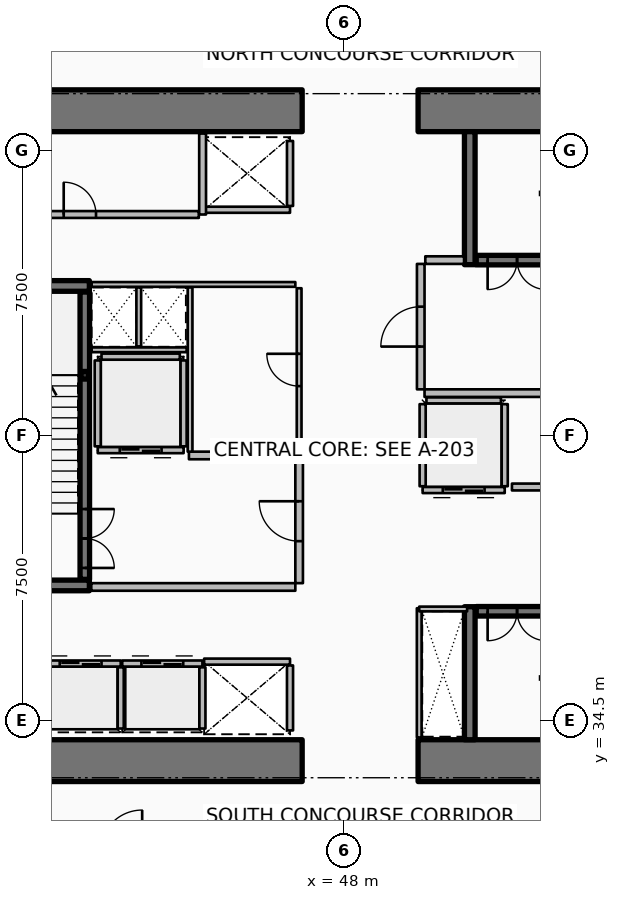
"""IFC4 building model, lengths in metres.
Left out: names, types, materials, properties, quantities, classifications, styles, units other than length and angle.
Written with IfcOpenShell. Run it as: python <this file> out.ifc"""

import sys

from ifc_helpers import new_model, si_unit, direction, frame, frame_2d, origin, origin_2d, place, context, subcontext, project, spatial, rectangle, hollow_rectangle, extrude, element, fill, save


model = new_model("IFC4")
c1 = context("Model", 3, precision=1e-05, world=origin(), true_north=direction((0.0, 1.0)))
c2 = subcontext(c1, "Body", "Model", "MODEL_VIEW")
j1 = project(units=[si_unit("LENGTHUNIT", "METRE"), si_unit("PLANEANGLEUNIT", "RADIAN")], contexts=[c1])
p1 = place(None, origin())
s1 = spatial("IfcSite", under=j1, at=p1, CompositionType="ELEMENT")
p2 = place(p1, origin())
s2 = spatial("IfcBuilding", under=s1, at=p2, CompositionType="ELEMENT")
p3 = place(p2, frame((0.0, 0.0, 7.2)))
s3 = spatial("IfcBuildingStorey", under=s2, at=p3, CompositionType="ELEMENT", Elevation=7.2)
for number, where, z_axis, x_axis in (
    (1, (36.7, 33.45, 0.0), (0.0, 0.0, 1.0), (1.0, 0.0, 0.0)),
    (2, (49.95, 33.45, 0.0), (0.0, 0.0, 1.0), (1.0, 0.0, 0.0)),
    (3, (36.7, 50.55, 0.0), (0.0, 0.0, 1.0), (1.0, 0.0, 0.0)),
    (4, (49.95, 50.55, 0.0), (0.0, 0.0, 1.0), (1.0, 0.0, 0.0)),
):
    element("IfcWall", number, at=place(p3, frame(where, z_axis=z_axis, x_axis=x_axis)), inside=s3, PredefinedType="SHEAR", context=c2, shape_type="SweptSolid", body=[
        extrude(rectangle(XDim=10.2, YDim=1.1, at=frame_2d((5.1, 0.0))), origin(), (0.0, 0.0, 1.0), 4.8),
    ])
for number, where, z_axis, x_axis in (
    (5, (37.8, 38.06, 0.0), (0.0, 0.0, 1.0), (1.0, 0.0, 0.0)),
    (6, (37.8, 45.94, 0.0), (0.0, 0.0, 1.0), (1.0, 0.0, 0.0)),
    (7, (51.31, 46.5, 0.0), (0.0, 0.0, 1.0), (0.0, 1.0, 0.0)),
    (8, (51.31, 34.0, 0.0), (0.0, 0.0, 1.0), (0.0, 1.0, 0.0)),
):
    element("IfcWall", number, at=place(p3, frame(where, z_axis=z_axis, x_axis=x_axis)), inside=s3, PredefinedType="SHEAR", context=c2, shape_type="SweptSolid", body=[
        extrude(rectangle(XDim=3.5, YDim=0.28, at=frame_2d((1.75, 0.0))), origin(), (0.0, 0.0, 1.0), 4.8),
    ])
p4 = place(p3, frame((41.18, 43.59, 0.0), z_axis=(0.0, 0.0, 1.0), x_axis=(1.0, 0.0, 0.0)))
e9 = element("IfcColumn", 9, at=p4, inside=s3, PredefinedType="COLUMN", context=c2, shape_type="SweptSolid", body=[
    extrude(hollow_rectangle(XDim=0.2, YDim=0.2, WallThickness=0.01, InnerFilletRadius=0.01, OuterFilletRadius=0.02, at=origin_2d()), origin(), (0.0, 0.0, 1.0), 2.195),
])
p5 = place(p3, frame((41.18, 38.22, 0.0), z_axis=(0.0, 0.0, 1.0), x_axis=(0.0, 1.0, 0.0)))
e10 = element("IfcWall", 10, at=p5, inside=s3, PredefinedType="SOLIDWALL", context=c2, shape_type="SweptSolid", body=[
    extrude(rectangle(XDim=7.56, YDim=0.25, at=frame_2d((3.78, 0.0))), origin(), (0.0, 0.0, 1.0), 4.48),
])
p6 = place(p5, frame((0.3, 0.0, 0.0)))
e11 = element("IfcOpeningElement", 11, at=p6, cuts=e10, PredefinedType="OPENING", context=c2, shape_type="SweptSolid", body=[
    extrude(rectangle(XDim=1.55, YDim=2.15, at=frame_2d((0.775, 1.075))), frame((0.0, 0.135, 0.0), z_axis=(0.0, -1.0, 0.0), x_axis=(1.0, 0.0, 0.0)), (0.0, 0.0, 1.0), 0.27),
])
p7 = place(p3, frame((51.48, 46.62, 0.0), z_axis=(0.0, 0.0, 1.0), x_axis=(1.0, 0.0, 0.0)))
e12 = element("IfcWall", 12, at=p7, inside=s3, PredefinedType="SOLIDWALL", context=c2, shape_type="SweptSolid", body=[
    extrude(rectangle(XDim=7.54, YDim=0.25, at=frame_2d((3.77, 0.0))), origin(), (0.0, 0.0, 1.0), 4.48),
])
p8 = place(p7, frame((0.3, 0.0, 0.0)))
e13 = element("IfcOpeningElement", 13, at=p8, cuts=e12, PredefinedType="OPENING", context=c2, shape_type="SweptSolid", body=[
    extrude(rectangle(XDim=1.55, YDim=2.15, at=frame_2d((0.775, 1.075))), frame((0.0, 0.135, 0.0), z_axis=(0.0, -1.0, 0.0), x_axis=(1.0, 0.0, 0.0)), (0.0, 0.0, 1.0), 0.27),
])
p9 = place(p3, frame((51.48, 37.38, 0.0), z_axis=(0.0, 0.0, 1.0), x_axis=(1.0, 0.0, 0.0)))
e14 = element("IfcWall", 14, at=p9, inside=s3, PredefinedType="SOLIDWALL", context=c2, shape_type="SweptSolid", body=[
    extrude(rectangle(XDim=7.54, YDim=0.25, at=frame_2d((3.77, 0.0))), origin(), (0.0, 0.0, 1.0), 4.48),
])
p10 = place(p9, frame((0.3, 0.0, 0.0)))
e15 = element("IfcOpeningElement", 15, at=p10, cuts=e14, PredefinedType="OPENING", context=c2, shape_type="SweptSolid", body=[
    extrude(rectangle(XDim=1.55, YDim=2.15, at=frame_2d((0.775, 1.075))), frame((0.0, 0.135, 0.0), z_axis=(0.0, -1.0, 0.0), x_axis=(1.0, 0.0, 0.0)), (0.0, 0.0, 1.0), 0.27),
])
p11 = place(p3, frame((40.015, 36.005, 0.0), z_axis=(0.0, 0.0, 1.0), x_axis=(1.0, 0.0, 0.0)))
e16 = element("IfcWall", 16, at=p11, inside=s3, PredefinedType="PARTITIONING", context=c2, shape_type="SweptSolid", body=[
    extrude(rectangle(XDim=2.11, YDim=0.16, at=frame_2d((1.055, 0.0))), origin(), (0.0, 0.0, 1.0), 4.48),
])
p12 = place(p11, frame((0.505, 0.0, 0.0)))
e17 = element("IfcOpeningElement", 17, at=p12, cuts=e16, PredefinedType="OPENING", context=c2, shape_type="SweptSolid", body=[
    extrude(rectangle(XDim=1.1, YDim=2.1, at=frame_2d((0.55, 1.05))), frame((0.0, 0.09, 0.0), z_axis=(0.0, -1.0, 0.0), x_axis=(1.0, 0.0, 0.0)), (0.0, 0.0, 1.0), 0.18),
])
p13 = place(p3, frame((42.125, 34.295, 0.0), z_axis=(0.0, 0.0, 1.0), x_axis=(0.0, 1.0, 0.0)))
e18 = element("IfcWall", 18, at=p13, inside=s3, PredefinedType="PARTITIONING", context=c2, shape_type="SweptSolid", body=[
    extrude(rectangle(XDim=1.61, YDim=0.16, at=frame_2d((0.805, 0.0))), origin(), (0.0, 0.0, 1.0), 4.48),
])
p14 = place(p3, frame((42.165, 36.005, 0.0), z_axis=(0.0, 0.0, 1.0), x_axis=(1.0, 0.0, 0.0)))
e19 = element("IfcWall", 19, at=p14, inside=s3, PredefinedType="PARTITIONING", context=c2, shape_type="SweptSolid", body=[
    extrude(rectangle(XDim=2.11, YDim=0.16, at=frame_2d((1.055, 0.0))), origin(), (0.0, 0.0, 1.0), 4.48),
])
p15 = place(p14, frame((0.505, 0.0, 0.0)))
e20 = element("IfcOpeningElement", 20, at=p15, cuts=e19, PredefinedType="OPENING", context=c2, shape_type="SweptSolid", body=[
    extrude(rectangle(XDim=1.1, YDim=2.1, at=frame_2d((0.55, 1.05))), frame((0.0, 0.09, 0.0), z_axis=(0.0, -1.0, 0.0), x_axis=(1.0, 0.0, 0.0)), (0.0, 0.0, 1.0), 0.18),
])
p16 = place(p3, frame((44.275, 34.295, 0.0), z_axis=(0.0, 0.0, 1.0), x_axis=(0.0, 1.0, 0.0)))
e21 = element("IfcWall", 21, at=p16, inside=s3, PredefinedType="PARTITIONING", context=c2, shape_type="SweptSolid", body=[
    extrude(rectangle(XDim=1.61, YDim=0.16, at=frame_2d((0.805, 0.0))), origin(), (0.0, 0.0, 1.0), 4.48),
])
p17 = place(p3, frame((46.58, 47.945, 0.0), z_axis=(0.0, 0.0, 1.0), x_axis=(-1.0, 0.0, 0.0)))
e22 = element("IfcWall", 22, at=p17, inside=s3, PredefinedType="PARTITIONING", context=c2, shape_type="SweptSolid", body=[
    extrude(rectangle(XDim=2.26, YDim=0.16, at=frame_2d((1.13, 0.0))), origin(), (0.0, 0.0, 1.0), 4.48),
])
p18 = place(p3, frame((46.58, 48.045, 0.0), z_axis=(0.0, 0.0, 1.0), x_axis=(0.0, 1.0, 0.0)))
e23 = element("IfcWall", 23, at=p18, inside=s3, PredefinedType="PARTITIONING", context=c2, shape_type="SweptSolid", body=[
    extrude(rectangle(XDim=1.71, YDim=0.16, at=frame_2d((0.855, 0.0))), origin(), (0.0, 0.0, 1.0), 4.48),
])
p19 = place(p3, frame((44.32, 36.055, 0.0), z_axis=(0.0, 0.0, 1.0), x_axis=(1.0, 0.0, 0.0)))
e24 = element("IfcWall", 24, at=p19, inside=s3, PredefinedType="PARTITIONING", context=c2, shape_type="SweptSolid", body=[
    extrude(rectangle(XDim=2.26, YDim=0.16, at=frame_2d((1.13, 0.0))), origin(), (0.0, 0.0, 1.0), 4.48),
])
p20 = place(p3, frame((46.58, 34.245, 0.0), z_axis=(0.0, 0.0, 1.0), x_axis=(0.0, 1.0, 0.0)))
e25 = element("IfcWall", 25, at=p20, inside=s3, PredefinedType="PARTITIONING", context=c2, shape_type="SweptSolid", body=[
    extrude(rectangle(XDim=1.71, YDim=0.16, at=frame_2d((0.855, 0.0))), origin(), (0.0, 0.0, 1.0), 4.48),
])
p21 = place(p3, frame((43.78, 41.62, 0.0), z_axis=(0.0, 0.0, 1.0), x_axis=(-1.0, 0.0, 0.0)))
e26 = element("IfcWall", 26, at=p21, inside=s3, PredefinedType="PARTITIONING", context=c2, shape_type="SweptSolid", body=[
    extrude(rectangle(XDim=2.26, YDim=0.16, at=frame_2d((1.13, 0.0))), origin(), (0.0, 0.0, 1.0), 4.48),
])
p22 = place(p21, frame((0.58, 0.0, 0.0)))
e27 = element("IfcOpeningElement", 27, at=p22, cuts=e26, PredefinedType="OPENING", context=c2, shape_type="SweptSolid", body=[
    extrude(rectangle(XDim=1.1, YDim=2.1, at=frame_2d((0.55, 1.05))), frame((0.0, 0.09, 0.0), z_axis=(0.0, -1.0, 0.0), x_axis=(1.0, 0.0, 0.0)), (0.0, 0.0, 1.0), 0.18),
])
for number, where, z_axis, x_axis in (
    (28, (43.78, 41.72, 0.0), (0.0, 0.0, 1.0), (0.0, 1.0, 0.0)),
    (29, (41.52, 41.72, 0.0), (0.0, 0.0, 1.0), (0.0, 1.0, 0.0)),
):
    element("IfcWall", number, at=place(p3, frame(where, z_axis=z_axis, x_axis=x_axis)), inside=s3, PredefinedType="PARTITIONING", context=c2, shape_type="SweptSolid", body=[
        extrude(rectangle(XDim=2.26, YDim=0.16, at=frame_2d((1.13, 0.0))), origin(), (0.0, 0.0, 1.0), 4.48),
    ])
p23 = place(p3, frame((41.62, 44.08, 0.0), z_axis=(0.0, 0.0, 1.0), x_axis=(1.0, 0.0, 0.0)))
e30 = element("IfcWall", 30, at=p23, inside=s3, PredefinedType="PARTITIONING", context=c2, shape_type="SweptSolid", body=[
    extrude(rectangle(XDim=2.06, YDim=0.16, at=frame_2d((1.03, 0.0))), origin(), (0.0, 0.0, 1.0), 4.48),
])
p24 = place(p3, frame((52.23, 40.57, 0.0), z_axis=(0.0, 0.0, 1.0), x_axis=(-1.0, 0.0, 0.0)))
e31 = element("IfcWall", 31, at=p24, inside=s3, PredefinedType="PARTITIONING", context=c2, shape_type="SweptSolid", body=[
    extrude(rectangle(XDim=2.16, YDim=0.16, at=frame_2d((1.08, 0.0))), origin(), (0.0, 0.0, 1.0), 4.48),
])
p25 = place(p24, frame((0.53, 0.0, 0.0)))
e32 = element("IfcOpeningElement", 32, at=p25, cuts=e31, PredefinedType="OPENING", context=c2, shape_type="SweptSolid", body=[
    extrude(rectangle(XDim=1.1, YDim=2.1, at=frame_2d((0.55, 1.05))), frame((0.0, 0.09, 0.0), z_axis=(0.0, -1.0, 0.0), x_axis=(1.0, 0.0, 0.0)), (0.0, 0.0, 1.0), 0.18),
])
for number, where, z_axis, x_axis in (
    (33, (52.23, 40.67, 0.0), (0.0, 0.0, 1.0), (0.0, 1.0, 0.0)),
    (34, (50.07, 40.67, 0.0), (0.0, 0.0, 1.0), (0.0, 1.0, 0.0)),
):
    element("IfcWall", number, at=place(p3, frame(where, z_axis=z_axis, x_axis=x_axis)), inside=s3, PredefinedType="PARTITIONING", context=c2, shape_type="SweptSolid", body=[
        extrude(rectangle(XDim=2.16, YDim=0.16, at=frame_2d((1.08, 0.0))), origin(), (0.0, 0.0, 1.0), 4.48),
    ])
p26 = place(p3, frame((50.17, 42.93, 0.0), z_axis=(0.0, 0.0, 1.0), x_axis=(1.0, 0.0, 0.0)))
e35 = element("IfcWall", 35, at=p26, inside=s3, PredefinedType="PARTITIONING", context=c2, shape_type="SweptSolid", body=[
    extrude(rectangle(XDim=1.96, YDim=0.16, at=frame_2d((0.98, 0.0))), origin(), (0.0, 0.0, 1.0), 4.48),
])
p27 = place(p3, frame((37.92, 47.82, 0.0), z_axis=(0.0, 0.0, 1.0), x_axis=(1.0, 0.0, 0.0)))
e36 = element("IfcWall", 36, at=p27, inside=s3, PredefinedType="PARTITIONING", context=c2, shape_type="SweptSolid", body=[
    extrude(rectangle(XDim=6.26, YDim=0.18, at=frame_2d((3.13, 0.0))), origin(), (0.0, 0.0, 1.0), 4.48),
])
p28 = place(p27, frame((2.705, 0.0, 0.0)))
e37 = element("IfcOpeningElement", 37, at=p28, cuts=e36, PredefinedType="OPENING", context=c2, shape_type="SweptSolid", body=[
    extrude(rectangle(XDim=0.85, YDim=2.06, at=frame_2d((0.425, 1.03))), frame((0.0, 0.1, 0.0), z_axis=(0.0, -1.0, 0.0), x_axis=(1.0, 0.0, 0.0)), (0.0, 0.0, 1.0), 0.2),
])
p29 = place(p3, frame((44.28, 47.82, 0.0), z_axis=(0.0, 0.0, 1.0), x_axis=(0.0, 1.0, 0.0)))
e38 = element("IfcWall", 38, at=p29, inside=s3, PredefinedType="PARTITIONING", context=c2, shape_type="SweptSolid", body=[
    extrude(rectangle(XDim=2.13, YDim=0.18, at=frame_2d((1.065, 0.0))), origin(), (0.0, 0.0, 1.0), 4.48),
])
p30 = place(p3, frame((52.42, 40.65, 0.0), z_axis=(0.0, 0.0, 1.0), x_axis=(1.0, 0.0, 0.0)))
e39 = element("IfcWall", 39, at=p30, inside=s3, PredefinedType="PARTITIONING", context=c2, shape_type="SweptSolid", body=[
    extrude(rectangle(XDim=6.5, YDim=0.18, at=frame_2d((3.25, 0.0))), origin(), (0.0, 0.0, 1.0), 4.48),
])
p31 = place(p30, frame((2.825, 0.0, 0.0)))
e40 = element("IfcOpeningElement", 40, at=p31, cuts=e39, PredefinedType="OPENING", context=c2, shape_type="SweptSolid", body=[
    extrude(rectangle(XDim=0.85, YDim=2.06, at=frame_2d((0.425, 1.03))), frame((0.0, 0.1, 0.0), z_axis=(0.0, -1.0, 0.0), x_axis=(1.0, 0.0, 0.0)), (0.0, 0.0, 1.0), 0.2),
])
p32 = place(p3, frame((41.35, 38.02, 0.0), z_axis=(0.0, 0.0, 1.0), x_axis=(1.0, 0.0, 0.0)))
e41 = element("IfcWall", 41, at=p32, inside=s3, PredefinedType="PARTITIONING", context=c2, shape_type="SweptSolid", body=[
    extrude(rectangle(XDim=5.37, YDim=0.2, at=frame_2d((2.685, 0.0))), origin(), (0.0, 0.0, 1.0), 4.48),
])
p33 = place(p3, frame((43.92, 41.48, 0.0), z_axis=(0.0, 0.0, 1.0), x_axis=(1.0, 0.0, 0.0)))
e42 = element("IfcWall", 42, at=p33, inside=s3, PredefinedType="PARTITIONING", context=c2, shape_type="SweptSolid", body=[
    extrude(rectangle(XDim=2.8, YDim=0.2, at=frame_2d((1.4, 0.0))), origin(), (0.0, 0.0, 1.0), 4.48),
])
p34 = place(p3, frame((46.82, 38.12, 0.0), z_axis=(0.0, 0.0, 1.0), x_axis=(0.0, 1.0, 0.0)))
e43 = element("IfcWall", 43, at=p34, inside=s3, PredefinedType="PARTITIONING", context=c2, shape_type="SweptSolid", body=[
    extrude(rectangle(XDim=3.26, YDim=0.2, at=frame_2d((1.63, 0.0))), origin(), (0.0, 0.0, 1.0), 4.48),
])
p35 = place(p34, frame((1.105, 0.0, 0.0)))
e44 = element("IfcOpeningElement", 44, at=p35, cuts=e43, PredefinedType="OPENING", context=c2, shape_type="SweptSolid", body=[
    extrude(rectangle(XDim=1.05, YDim=2.1, at=frame_2d((0.525, 1.05))), frame((0.0, 0.11, 0.0), z_axis=(0.0, -1.0, 0.0), x_axis=(1.0, 0.0, 0.0)), (0.0, 0.0, 1.0), 0.22),
])
p36 = place(p3, frame((50.12, 43.12, 0.0), z_axis=(0.0, 0.0, 1.0), x_axis=(1.0, 0.0, 0.0)))
e45 = element("IfcWall", 45, at=p36, inside=s3, PredefinedType="PARTITIONING", context=c2, shape_type="SweptSolid", body=[
    extrude(rectangle(XDim=8.88, YDim=0.2, at=frame_2d((4.44, 0.0))), origin(), (0.0, 0.0, 1.0), 4.48),
])
p37 = place(p3, frame((50.14, 46.62, 0.0), z_axis=(0.0, 0.0, 1.0), x_axis=(1.0, 0.0, 0.0)))
e46 = element("IfcWall", 46, at=p37, inside=s3, PredefinedType="PARTITIONING", context=c2, shape_type="SweptSolid", body=[
    extrude(rectangle(XDim=1.02, YDim=0.2, at=frame_2d((0.51, 0.0))), origin(), (0.0, 0.0, 1.0), 4.48),
])
p38 = place(p3, frame((50.02, 43.22, 0.0), z_axis=(0.0, 0.0, 1.0), x_axis=(0.0, 1.0, 0.0)))
e47 = element("IfcWall", 47, at=p38, inside=s3, PredefinedType="PARTITIONING", context=c2, shape_type="SweptSolid", body=[
    extrude(rectangle(XDim=3.3, YDim=0.2, at=frame_2d((1.65, 0.0))), origin(), (0.0, 0.0, 1.0), 4.48),
])
p39 = place(p38, frame((1.125, 0.0, 0.0)))
e48 = element("IfcOpeningElement", 48, at=p39, cuts=e47, PredefinedType="OPENING", context=c2, shape_type="SweptSolid", body=[
    extrude(rectangle(XDim=1.05, YDim=2.1, at=frame_2d((0.525, 1.05))), frame((0.0, 0.11, 0.0), z_axis=(0.0, -1.0, 0.0), x_axis=(1.0, 0.0, 0.0)), (0.0, 0.0, 1.0), 0.22),
])
p40 = place(p3, frame((41.36, 45.98, 0.0), z_axis=(0.0, 0.0, 1.0), x_axis=(1.0, 0.0, 0.0)))
e49 = element("IfcWall", 49, at=p40, inside=s3, PredefinedType="PARTITIONING", context=c2, shape_type="SweptSolid", body=[
    extrude(rectangle(XDim=5.36, YDim=0.125, at=frame_2d((2.68, 0.0))), origin(), (0.0, 0.0, 1.0), 3.92),
])
p41 = place(p3, frame((41.36, 44.26, 0.0), z_axis=(0.0, 0.0, 1.0), x_axis=(1.0, 0.0, 0.0)))
e50 = element("IfcWall", 50, at=p41, inside=s3, PredefinedType="PARTITIONING", context=c2, shape_type="SweptSolid", body=[
    extrude(rectangle(XDim=2.5, YDim=0.125, at=frame_2d((1.25, 0.0))), origin(), (0.0, 0.0, 1.0), 3.92),
])
p42 = place(p3, frame((42.6, 44.35, 0.0), z_axis=(0.0, 0.0, 1.0), x_axis=(0.0, 1.0, 0.0)))
e51 = element("IfcWall", 51, at=p42, inside=s3, PredefinedType="PARTITIONING", context=c2, shape_type="SweptSolid", body=[
    extrude(rectangle(XDim=1.55, YDim=0.125, at=frame_2d((0.775, 0.0))), origin(), (0.0, 0.0, 1.0), 3.92),
])
p43 = place(p3, frame((49.98, 34.06, 0.0), z_axis=(0.0, 0.0, 1.0), x_axis=(0.0, 1.0, 0.0)))
e52 = element("IfcWall", 52, at=p43, inside=s3, PredefinedType="PARTITIONING", context=c2, shape_type="SweptSolid", body=[
    extrude(rectangle(XDim=3.4, YDim=0.125, at=frame_2d((1.7, 0.0))), origin(), (0.0, 0.0, 1.0), 3.92),
])
p44 = place(p3, frame((49.98, 37.44, 0.0), z_axis=(0.0, 0.0, 1.0), x_axis=(1.0, 0.0, 0.0)))
e53 = element("IfcWall", 53, at=p44, inside=s3, PredefinedType="PARTITIONING", context=c2, shape_type="SweptSolid", body=[
    extrude(rectangle(XDim=1.26, YDim=0.125, at=frame_2d((0.63, 0.0))), origin(), (0.0, 0.0, 1.0), 3.92),
])
p45 = place(p3, frame((43.95, 41.58, 0.0), z_axis=(0.0, 0.0, 1.0), x_axis=(0.0, 1.0, 0.0)))
e54 = element("IfcWall", 54, at=p45, inside=s3, PredefinedType="PARTITIONING", context=c2, shape_type="SweptSolid", body=[
    extrude(rectangle(XDim=4.32, YDim=0.125, at=frame_2d((2.16, 0.0))), origin(), (0.0, 0.0, 1.0), 3.92),
])
p46 = place(p3, frame((46.82, 41.58, 0.0), z_axis=(0.0, 0.0, 1.0), x_axis=(0.0, 1.0, 0.0)))
e55 = element("IfcWall", 55, at=p46, inside=s3, PredefinedType="PARTITIONING", context=c2, shape_type="SweptSolid", body=[
    extrude(rectangle(XDim=4.3, YDim=0.125, at=frame_2d((2.15, 0.0))), origin(), (0.0, 0.0, 1.0), 3.92),
])
p47 = place(p46, frame((1.725, 0.0, 0.0)))
e56 = element("IfcOpeningElement", 56, at=p47, cuts=e55, PredefinedType="OPENING", context=c2, shape_type="SweptSolid", body=[
    extrude(rectangle(XDim=0.85, YDim=2.06, at=frame_2d((0.425, 1.03))), frame((0.0, 0.073, 0.0), z_axis=(0.0, -1.0, 0.0), x_axis=(1.0, 0.0, 0.0)), (0.0, 0.0, 1.0), 0.145),
])
p48 = place(p6, origin())
e57 = element("IfcDoor", 57, at=p48, inside=s3, OperationType="DOUBLE_DOOR_SINGLE_SWING", PredefinedType="DOOR", context=c2, shape_type="SweptSolid", body=[
    extrude(rectangle(XDim=1.55, YDim=2.15, at=frame_2d((0.775, 1.075))), frame((0.0, 0.025, 0.0), z_axis=(0.0, -1.0, 0.0), x_axis=(1.0, 0.0, 0.0)), (0.0, 0.0, 1.0), 0.05),
])
fill(e11, e57)
p49 = place(p8, origin())
e58 = element("IfcDoor", 58, at=p49, inside=s3, OperationType="DOUBLE_DOOR_SINGLE_SWING", PredefinedType="DOOR", context=c2, shape_type="SweptSolid", body=[
    extrude(rectangle(XDim=1.55, YDim=2.15, at=frame_2d((0.775, 1.075))), frame((0.0, 0.025, 0.0), z_axis=(0.0, -1.0, 0.0), x_axis=(1.0, 0.0, 0.0)), (0.0, 0.0, 1.0), 0.05),
])
fill(e13, e58)
p50 = place(p10, origin())
e59 = element("IfcDoor", 59, at=p50, inside=s3, OperationType="DOUBLE_DOOR_SINGLE_SWING", PredefinedType="DOOR", context=c2, shape_type="SweptSolid", body=[
    extrude(rectangle(XDim=1.55, YDim=2.15, at=frame_2d((0.775, 1.075))), frame((0.0, 0.025, 0.0), z_axis=(0.0, -1.0, 0.0), x_axis=(1.0, 0.0, 0.0)), (0.0, 0.0, 1.0), 0.05),
])
fill(e15, e59)
p51 = place(p12, origin())
e60 = element("IfcDoor", 60, at=p51, inside=s3, OperationType="DOUBLE_DOOR_SLIDING", PredefinedType="DOOR", context=c2, shape_type="SweptSolid", body=[
    extrude(rectangle(XDim=1.1, YDim=2.1, at=frame_2d((0.55, 1.05))), frame((0.0, 0.025, 0.0), z_axis=(0.0, -1.0, 0.0), x_axis=(1.0, 0.0, 0.0)), (0.0, 0.0, 1.0), 0.05),
])
fill(e17, e60)
p52 = place(p15, origin())
e61 = element("IfcDoor", 61, at=p52, inside=s3, OperationType="DOUBLE_DOOR_SLIDING", PredefinedType="DOOR", context=c2, shape_type="SweptSolid", body=[
    extrude(rectangle(XDim=1.1, YDim=2.1, at=frame_2d((0.55, 1.05))), frame((0.0, 0.025, 0.0), z_axis=(0.0, -1.0, 0.0), x_axis=(1.0, 0.0, 0.0)), (0.0, 0.0, 1.0), 0.05),
])
fill(e20, e61)
p53 = place(p22, origin())
e62 = element("IfcDoor", 62, at=p53, inside=s3, OperationType="DOUBLE_DOOR_SLIDING", PredefinedType="DOOR", context=c2, shape_type="SweptSolid", body=[
    extrude(rectangle(XDim=1.1, YDim=2.1, at=frame_2d((0.55, 1.05))), frame((0.0, 0.025, 0.0), z_axis=(0.0, -1.0, 0.0), x_axis=(1.0, 0.0, 0.0)), (0.0, 0.0, 1.0), 0.05),
])
fill(e27, e62)
p54 = place(p25, origin())
e63 = element("IfcDoor", 63, at=p54, inside=s3, OperationType="DOUBLE_DOOR_SLIDING", PredefinedType="DOOR", context=c2, shape_type="SweptSolid", body=[
    extrude(rectangle(XDim=1.1, YDim=2.1, at=frame_2d((0.55, 1.05))), frame((0.0, 0.025, 0.0), z_axis=(0.0, -1.0, 0.0), x_axis=(1.0, 0.0, 0.0)), (0.0, 0.0, 1.0), 0.05),
])
fill(e32, e63)
p55 = place(p28, origin())
e64 = element("IfcDoor", 64, at=p55, inside=s3, OperationType="SINGLE_SWING_LEFT", PredefinedType="DOOR", context=c2, shape_type="SweptSolid", body=[
    extrude(rectangle(XDim=0.85, YDim=2.06, at=frame_2d((0.425, 1.03))), frame((0.0, 0.025, 0.0), z_axis=(0.0, -1.0, 0.0), x_axis=(1.0, 0.0, 0.0)), (0.0, 0.0, 1.0), 0.05),
])
fill(e37, e64)
p56 = place(p35, origin())
e65 = element("IfcDoor", 65, at=p56, inside=s3, OperationType="SINGLE_SWING_RIGHT", PredefinedType="DOOR", context=c2, shape_type="SweptSolid", body=[
    extrude(rectangle(XDim=1.05, YDim=2.1, at=frame_2d((0.525, 1.05))), frame((0.0, 0.025, 0.0), z_axis=(0.0, -1.0, 0.0), x_axis=(1.0, 0.0, 0.0)), (0.0, 0.0, 1.0), 0.05),
])
fill(e44, e65)
p57 = place(p39, origin())
e66 = element("IfcDoor", 66, at=p57, inside=s3, OperationType="SINGLE_SWING_LEFT", PredefinedType="DOOR", context=c2, shape_type="SweptSolid", body=[
    extrude(rectangle(XDim=1.05, YDim=2.1, at=frame_2d((0.525, 1.05))), frame((0.0, 0.025, 0.0), z_axis=(0.0, -1.0, 0.0), x_axis=(1.0, 0.0, 0.0)), (0.0, 0.0, 1.0), 0.05),
])
fill(e48, e66)
p58 = place(p47, origin())
e67 = element("IfcDoor", 67, at=p58, inside=s3, OperationType="SINGLE_SWING_RIGHT", PredefinedType="DOOR", context=c2, shape_type="SweptSolid", body=[
    extrude(rectangle(XDim=0.85, YDim=2.06, at=frame_2d((0.425, 1.03))), frame((0.0, 0.025, 0.0), z_axis=(0.0, -1.0, 0.0), x_axis=(1.0, 0.0, 0.0)), (0.0, 0.0, 1.0), 0.05),
])
fill(e56, e67)
save(model, sys.argv[1])
